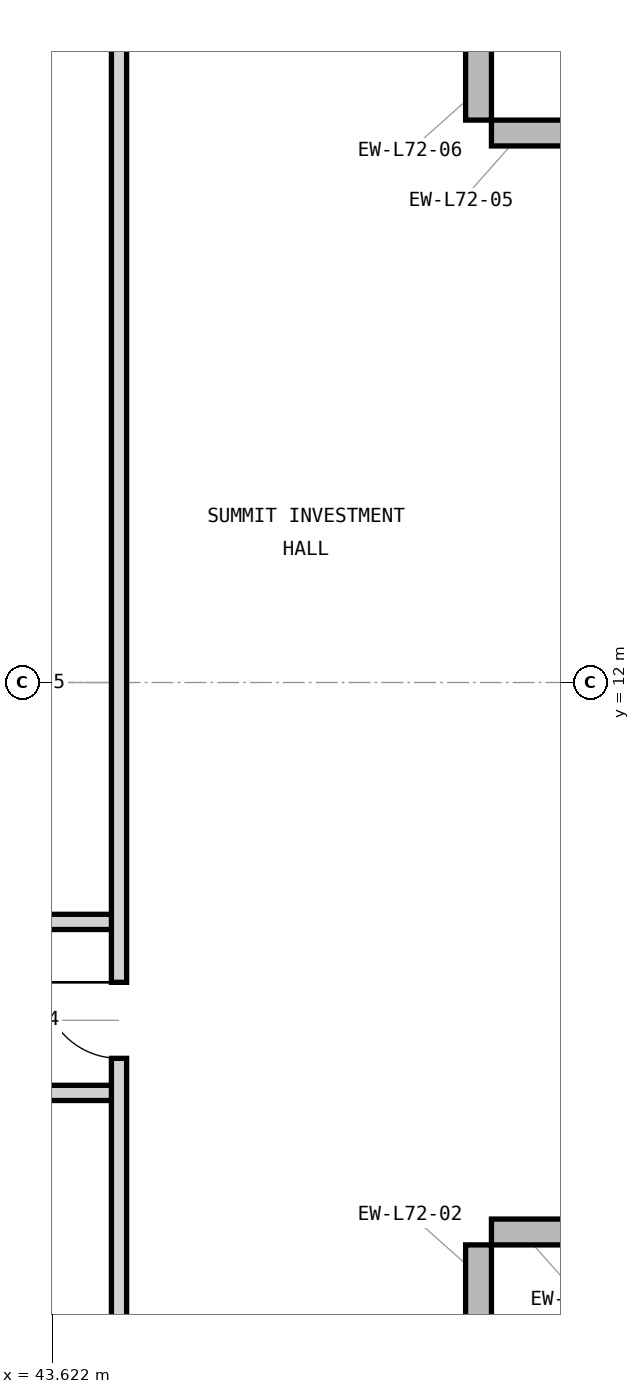
"""IFC4 building model, lengths in metres.
Left out: names, types, materials, properties, quantities, classifications, styles, units other than length and angle.
Written with IfcOpenShell. Run it as: python <this file> out.ifc"""

import sys

from ifc_helpers import new_model, si_unit, direction, frame, frame_2d, origin, place, context, subcontext, project, spatial, rectangle, extrude, element, fill, save


model = new_model("IFC4")
c1 = context("Model", 3, precision=1e-05, world=origin(), true_north=direction((0.0, 1.0)))
c2 = subcontext(c1, "Body", "Model", "MODEL_VIEW")
j1 = project(units=[si_unit("LENGTHUNIT", "METRE"), si_unit("PLANEANGLEUNIT", "RADIAN")], contexts=[c1])
p1 = place(None, origin())
s1 = spatial("IfcSite", under=j1, at=p1, CompositionType="ELEMENT")
p2 = place(p1, origin())
s2 = spatial("IfcBuilding", under=s1, at=p2, CompositionType="ELEMENT")
p3 = place(p2, frame((0.0, 0.0, 293.7)))
s3 = spatial("IfcBuildingStorey", under=s2, at=p3, CompositionType="ELEMENT", Elevation=293.7)
for number, where, z_axis, x_axis in (
    (1, (49.23, 3.0, 0.0), (0.0, 0.0, 1.0), (0.0, 1.0, 0.0)),
    (2, (49.4, 4.77, 0.0), (0.0, 0.0, 1.0), (1.0, 0.0, 0.0)),
    (3, (51.0, 19.23, 0.0), (0.0, 0.0, 1.0), (-1.0, 0.0, 0.0)),
    (4, (49.23, 19.4, 0.0), (0.0, 0.0, 1.0), (0.0, 1.0, 0.0)),
):
    element("IfcWall", number, at=place(p3, frame(where, z_axis=z_axis, x_axis=x_axis)), inside=s3, PredefinedType="STANDARD", context=c2, shape_type="SweptSolid", body=[
        extrude(rectangle(XDim=1.6, YDim=0.34, at=frame_2d((0.8, 0.0))), origin(), (0.0, 0.0, 1.0), 3.715),
    ])
p4 = place(p3, frame((39.2, 6.6, 0.0), z_axis=(0.0, 0.0, 1.0), x_axis=(1.0, 0.0, 0.0)))
e5 = element("IfcWall", 5, at=p4, inside=s3, PredefinedType="PARTITIONING", context=c2, shape_type="SweptSolid", body=[
    extrude(rectangle(XDim=5.3, YDim=0.2, at=frame_2d((2.65, 0.0))), origin(), (0.0, 0.0, 1.0), 3.705),
])
p5 = place(p4, frame((2.15, 0.0, 0.0)))
e6 = element("IfcOpeningElement", 6, at=p5, cuts=e5, PredefinedType="OPENING", context=c2, shape_type="SweptSolid", body=[
    extrude(rectangle(XDim=1.0, YDim=2.15, at=frame_2d((0.5, 1.075))), frame((0.0, 0.11, 0.0), z_axis=(0.0, -1.0, 0.0), x_axis=(1.0, 0.0, 0.0)), (0.0, 0.0, 1.0), 0.22),
])
p6 = place(p3, frame((37.2, 8.85, 0.0), z_axis=(0.0, 0.0, 1.0), x_axis=(1.0, 0.0, 0.0)))
e7 = element("IfcWall", 7, at=p6, inside=s3, PredefinedType="PARTITIONING", context=c2, shape_type="SweptSolid", body=[
    extrude(rectangle(XDim=7.3, YDim=0.2, at=frame_2d((3.65, 0.0))), origin(), (0.0, 0.0, 1.0), 3.705),
])
p7 = place(p6, frame((3.15, 0.0, 0.0)))
e8 = element("IfcOpeningElement", 8, at=p7, cuts=e7, PredefinedType="OPENING", context=c2, shape_type="SweptSolid", body=[
    extrude(rectangle(XDim=1.0, YDim=2.15, at=frame_2d((0.5, 1.075))), frame((0.0, 0.11, 0.0), z_axis=(0.0, -1.0, 0.0), x_axis=(1.0, 0.0, 0.0)), (0.0, 0.0, 1.0), 0.22),
])
p8 = place(p3, frame((44.5, 3.18, 0.0), z_axis=(0.0, 0.0, 1.0), x_axis=(0.0, 1.0, 0.0)))
e9 = element("IfcWall", 9, at=p8, inside=s3, PredefinedType="PARTITIONING", context=c2, shape_type="SweptSolid", body=[
    extrude(rectangle(XDim=17.64, YDim=0.2, at=frame_2d((8.82, 0.0))), origin(), (0.0, 0.0, 1.0), 3.705),
])
p9 = place(p8, frame((3.875, 0.0, 0.0)))
e10 = element("IfcOpeningElement", 10, at=p9, cuts=e9, PredefinedType="OPENING", context=c2, shape_type="SweptSolid", body=[
    extrude(rectangle(XDim=1.0, YDim=2.15, at=frame_2d((0.5, 1.075))), frame((0.0, 0.11, 0.0), z_axis=(0.0, -1.0, 0.0), x_axis=(1.0, 0.0, 0.0)), (0.0, 0.0, 1.0), 0.22),
])
p10 = place(p9, origin())
e11 = element("IfcDoor", 11, at=p10, inside=s3, OperationType="SINGLE_SWING_RIGHT", PredefinedType="DOOR", context=c2, shape_type="SweptSolid", body=[
    extrude(rectangle(XDim=1.0, YDim=2.15, at=frame_2d((0.5, 1.075))), frame((0.0, 0.025, 0.0), z_axis=(0.0, -1.0, 0.0), x_axis=(1.0, 0.0, 0.0)), (0.0, 0.0, 1.0), 0.05),
])
fill(e10, e11)
save(model, sys.argv[1])
